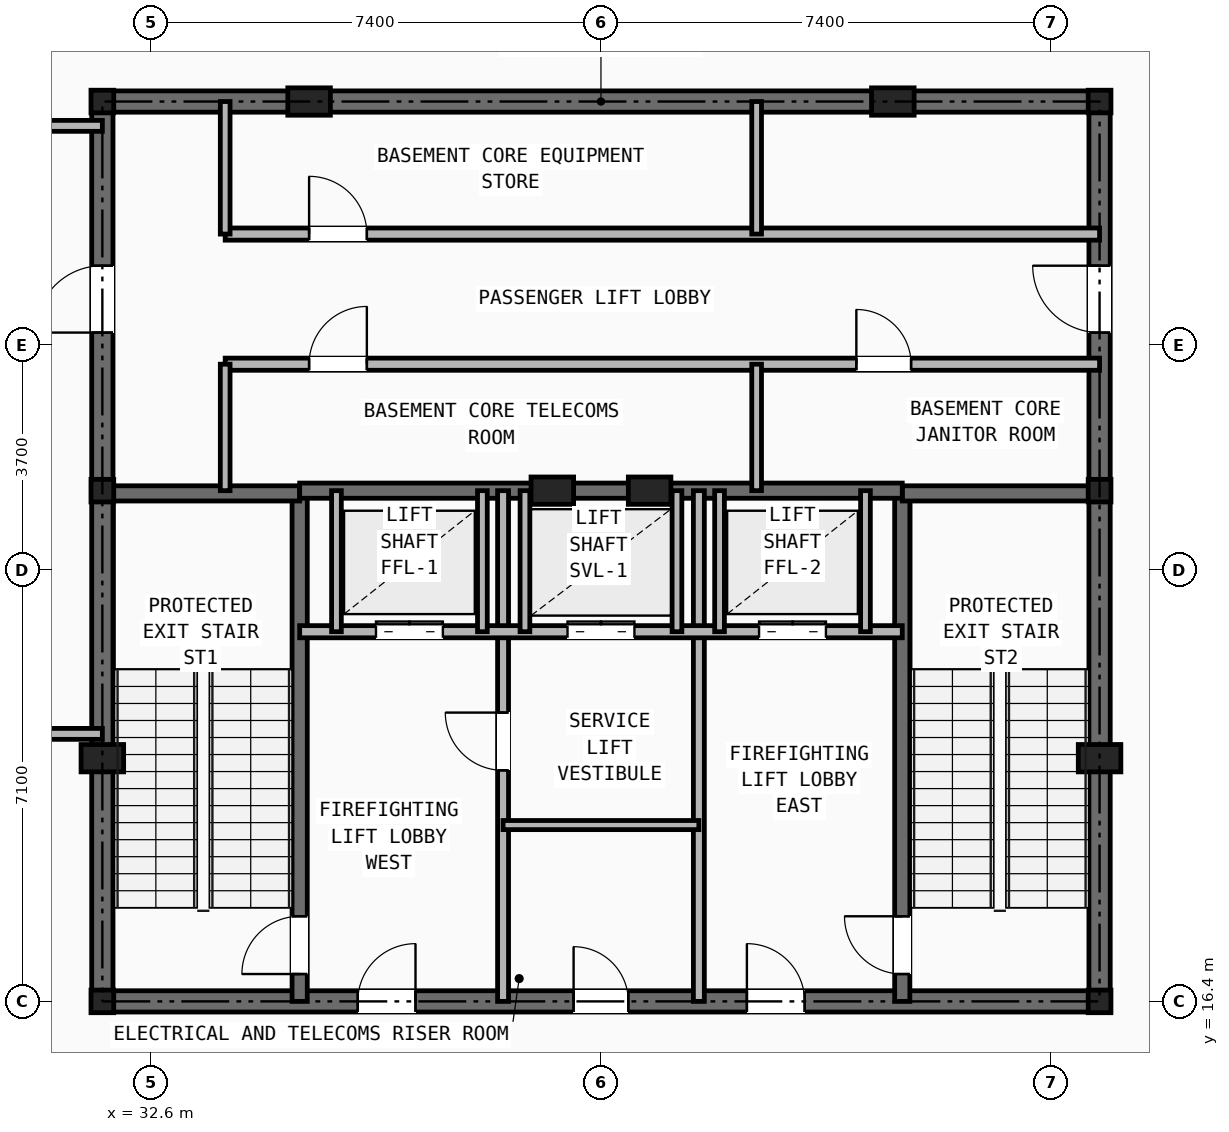
"""IFC4 building model, lengths in metres.
Left out: names, types, materials, properties, quantities, classifications, styles, units other than length and angle.
Written with IfcOpenShell. Run it as: python <this file> out.ifc"""

import sys

from ifc_helpers import new_model, si_unit, direction, frame, frame_2d, origin, origin_2d, place, context, subcontext, project, spatial, rectangle, i_section, extrude, element, fill, save


model = new_model("IFC4")
c1 = context("Model", 3, precision=1e-05, world=origin(), true_north=direction((0.0, 1.0)))
c2 = subcontext(c1, "Body", "Model", "MODEL_VIEW")
j1 = project(units=[si_unit("LENGTHUNIT", "METRE"), si_unit("PLANEANGLEUNIT", "RADIAN")], contexts=[c1])
p1 = place(None, origin())
s1 = spatial("IfcSite", under=j1, at=p1, CompositionType="ELEMENT")
p2 = place(p1, origin())
s2 = spatial("IfcBuilding", under=s1, at=p2, CompositionType="ELEMENT")
p3 = place(p2, frame((0.0, 0.0, -10.0)))
s3 = spatial("IfcBuildingStorey", under=s2, at=p3, CompositionType="ELEMENT", Elevation=-10.0)
for number, where, z_axis, x_axis in (
    (1, (31.8, 16.4, 0.0), (0.0, 0.0, 1.0), (1.0, 0.0, 0.0)),
    (2, (48.2, 16.4, 0.0), (0.0, 0.0, 1.0), (1.0, 0.0, 0.0)),
    (3, (31.8, 24.8, 0.0), (0.0, 0.0, 1.0), (1.0, 0.0, 0.0)),
    (4, (48.2, 24.8, 0.0), (0.0, 0.0, 1.0), (1.0, 0.0, 0.0)),
    (5, (31.8, 31.2, 0.0), (0.0, 0.0, 1.0), (1.0, 0.0, 0.0)),
    (6, (48.2, 31.2, 0.0), (0.0, 0.0, 1.0), (1.0, 0.0, 0.0)),
):
    element("IfcColumn", number, at=place(p3, frame(where, z_axis=z_axis, x_axis=x_axis)), inside=s3, PredefinedType="COLUMN", context=c2, shape_type="SweptSolid", body=[
        extrude(i_section(OverallWidth=0.374, OverallDepth=0.372, WebThickness=0.016, FlangeThickness=0.026, at=origin_2d()), origin(), (0.0, 0.0, 1.0), 5.0),
    ])
for number, where, z_axis, x_axis in (
    (7, (31.8, 20.4, 0.0), (0.0, 0.0, 1.0), (1.0, 0.0, 0.0)),
    (8, (48.2, 20.4, 0.0), (0.0, 0.0, 1.0), (1.0, 0.0, 0.0)),
    (9, (35.2, 31.2, 0.0), (0.0, 0.0, 1.0), (1.0, 0.0, 0.0)),
    (10, (44.8, 31.2, 0.0), (0.0, 0.0, 1.0), (1.0, 0.0, 0.0)),
    (11, (39.2, 24.8, 0.0), (0.0, 0.0, 1.0), (1.0, 0.0, 0.0)),
    (12, (40.8, 24.8, 0.0), (0.0, 0.0, 1.0), (1.0, 0.0, 0.0)),
):
    element("IfcColumn", number, at=place(p3, frame(where, z_axis=z_axis, x_axis=x_axis)), inside=s3, PredefinedType="PILASTER", context=c2, shape_type="SweptSolid", body=[
        extrude(rectangle(XDim=0.7, YDim=0.45, at=origin_2d()), origin(), (0.0, 0.0, 1.0), 5.0),
    ])
p4 = place(p3, frame((31.8, 16.4, 0.0), z_axis=(0.0, 0.0, 1.0), x_axis=(1.0, 0.0, 0.0)))
e13 = element("IfcWall", 13, at=p4, inside=s3, PredefinedType="SHEAR", context=c2, shape_type="SweptSolid", body=[
    extrude(rectangle(XDim=16.4, YDim=0.35, at=frame_2d((8.2, 0.0))), origin(), (0.0, 0.0, 1.0), 4.64),
])
p5 = place(p4, frame((7.75, 0.0, 0.0)))
e14 = element("IfcOpeningElement", 14, at=p5, cuts=e13, PredefinedType="OPENING", context=c2, shape_type="SweptSolid", body=[
    extrude(rectangle(XDim=0.9, YDim=2.1, at=frame_2d((0.45, 1.05))), frame((0.0, 0.185, 0.0), z_axis=(0.0, -1.0, 0.0), x_axis=(1.0, 0.0, 0.0)), (0.0, 0.0, 1.0), 0.37),
])
p6 = place(p4, frame((4.2, 0.0, 0.0)))
e15 = element("IfcOpeningElement", 15, at=p6, cuts=e13, PredefinedType="OPENING", context=c2, shape_type="SweptSolid", body=[
    extrude(rectangle(XDim=0.95, YDim=2.1, at=frame_2d((0.475, 1.05))), frame((0.0, 0.185, 0.0), z_axis=(0.0, -1.0, 0.0), x_axis=(1.0, 0.0, 0.0)), (0.0, 0.0, 1.0), 0.37),
])
p7 = place(p4, frame((10.6, 0.0, 0.0)))
e16 = element("IfcOpeningElement", 16, at=p7, cuts=e13, PredefinedType="OPENING", context=c2, shape_type="SweptSolid", body=[
    extrude(rectangle(XDim=0.95, YDim=2.1, at=frame_2d((0.475, 1.05))), frame((0.0, 0.185, 0.0), z_axis=(0.0, -1.0, 0.0), x_axis=(1.0, 0.0, 0.0)), (0.0, 0.0, 1.0), 0.37),
])
p8 = place(p3, frame((31.8, 31.2, 0.0), z_axis=(0.0, 0.0, 1.0), x_axis=(1.0, 0.0, 0.0)))
e17 = element("IfcWall", 17, at=p8, inside=s3, PredefinedType="SHEAR", context=c2, shape_type="SweptSolid", body=[
    extrude(rectangle(XDim=16.4, YDim=0.35, at=frame_2d((8.2, 0.0))), origin(), (0.0, 0.0, 1.0), 4.64),
])
p9 = place(p3, frame((31.8, 16.4, 0.0), z_axis=(0.0, 0.0, 1.0), x_axis=(0.0, 1.0, 0.0)))
e18 = element("IfcWall", 18, at=p9, inside=s3, PredefinedType="SHEAR", context=c2, shape_type="SweptSolid", body=[
    extrude(rectangle(XDim=14.8, YDim=0.35, at=frame_2d((7.4, 0.0))), origin(), (0.0, 0.0, 1.0), 4.64),
])
p10 = place(p9, frame((11.0, 0.0, 0.0)))
e19 = element("IfcOpeningElement", 19, at=p10, cuts=e18, PredefinedType="OPENING", context=c2, shape_type="SweptSolid", body=[
    extrude(rectangle(XDim=1.1, YDim=2.15, at=frame_2d((0.55, 1.075))), frame((0.0, 0.185, 0.0), z_axis=(0.0, -1.0, 0.0), x_axis=(1.0, 0.0, 0.0)), (0.0, 0.0, 1.0), 0.37),
])
p11 = place(p3, frame((48.2, 16.4, 0.0), z_axis=(0.0, 0.0, 1.0), x_axis=(0.0, 1.0, 0.0)))
e20 = element("IfcWall", 20, at=p11, inside=s3, PredefinedType="SHEAR", context=c2, shape_type="SweptSolid", body=[
    extrude(rectangle(XDim=14.8, YDim=0.35, at=frame_2d((7.4, 0.0))), origin(), (0.0, 0.0, 1.0), 4.64),
])
p12 = place(p11, frame((11.0, 0.0, 0.0)))
e21 = element("IfcOpeningElement", 21, at=p12, cuts=e20, PredefinedType="OPENING", context=c2, shape_type="SweptSolid", body=[
    extrude(rectangle(XDim=1.1, YDim=2.15, at=frame_2d((0.55, 1.075))), frame((0.0, 0.185, 0.0), z_axis=(0.0, -1.0, 0.0), x_axis=(1.0, 0.0, 0.0)), (0.0, 0.0, 1.0), 0.37),
])
p13 = place(p3, frame((35.045, 16.4, 0.0), z_axis=(0.0, 0.0, 1.0), x_axis=(0.0, 1.0, 0.0)))
e22 = element("IfcWall", 22, at=p13, inside=s3, PredefinedType="SHEAR", context=c2, shape_type="SweptSolid", body=[
    extrude(rectangle(XDim=8.4, YDim=0.25, at=frame_2d((4.2, 0.0))), origin(), (0.0, 0.0, 1.0), 4.64),
])
p14 = place(p13, frame((0.45, 0.0, 0.0)))
e23 = element("IfcOpeningElement", 23, at=p14, cuts=e22, PredefinedType="OPENING", context=c2, shape_type="SweptSolid", body=[
    extrude(rectangle(XDim=0.95, YDim=2.1, at=frame_2d((0.475, 1.05))), frame((0.0, 0.135, 0.0), z_axis=(0.0, -1.0, 0.0), x_axis=(1.0, 0.0, 0.0)), (0.0, 0.0, 1.0), 0.27),
])
p15 = place(p3, frame((31.8, 24.755, 0.0), z_axis=(0.0, 0.0, 1.0), x_axis=(1.0, 0.0, 0.0)))
e24 = element("IfcWall", 24, at=p15, inside=s3, PredefinedType="SHEAR", context=c2, shape_type="SweptSolid", body=[
    extrude(rectangle(XDim=3.245, YDim=0.25, at=frame_2d((1.623, 0.0))), origin(), (0.0, 0.0, 1.0), 4.64),
])
p16 = place(p3, frame((44.955, 16.4, 0.0), z_axis=(0.0, 0.0, 1.0), x_axis=(0.0, 1.0, 0.0)))
e25 = element("IfcWall", 25, at=p16, inside=s3, PredefinedType="SHEAR", context=c2, shape_type="SweptSolid", body=[
    extrude(rectangle(XDim=8.4, YDim=0.25, at=frame_2d((4.2, 0.0))), origin(), (0.0, 0.0, 1.0), 4.64),
])
p17 = place(p16, frame((0.45, 0.0, 0.0)))
e26 = element("IfcOpeningElement", 26, at=p17, cuts=e25, PredefinedType="OPENING", context=c2, shape_type="SweptSolid", body=[
    extrude(rectangle(XDim=0.95, YDim=2.1, at=frame_2d((0.475, 1.05))), frame((0.0, 0.135, 0.0), z_axis=(0.0, -1.0, 0.0), x_axis=(1.0, 0.0, 0.0)), (0.0, 0.0, 1.0), 0.27),
])
p18 = place(p3, frame((44.955, 24.755, 0.0), z_axis=(0.0, 0.0, 1.0), x_axis=(1.0, 0.0, 0.0)))
e27 = element("IfcWall", 27, at=p18, inside=s3, PredefinedType="SHEAR", context=c2, shape_type="SweptSolid", body=[
    extrude(rectangle(XDim=3.245, YDim=0.25, at=frame_2d((1.623, 0.0))), origin(), (0.0, 0.0, 1.0), 4.64),
])
p19 = place(p3, frame((35.045, 24.8, 0.0), z_axis=(0.0, 0.0, 1.0), x_axis=(1.0, 0.0, 0.0)))
e28 = element("IfcWall", 28, at=p19, inside=s3, PredefinedType="SHEAR", context=c2, shape_type="SweptSolid", body=[
    extrude(rectangle(XDim=9.91, YDim=0.25, at=frame_2d((4.955, 0.0))), origin(), (0.0, 0.0, 1.0), 4.64),
])
p20 = place(p3, frame((38.39, 16.4, 0.0), z_axis=(0.0, 0.0, 1.0), x_axis=(0.0, 1.0, 0.0)))
e29 = element("IfcWall", 29, at=p20, inside=s3, PredefinedType="PARTITIONING", context=c2, shape_type="SweptSolid", body=[
    extrude(rectangle(XDim=8.4, YDim=0.18, at=frame_2d((4.2, 0.0))), origin(), (0.0, 0.0, 1.0), 3.78),
])
p21 = place(p20, frame((3.8, 0.0, 0.0)))
e30 = element("IfcOpeningElement", 30, at=p21, cuts=e29, PredefinedType="OPENING", context=c2, shape_type="SweptSolid", body=[
    extrude(rectangle(XDim=0.95, YDim=2.1, at=frame_2d((0.475, 1.05))), frame((0.0, 0.1, 0.0), z_axis=(0.0, -1.0, 0.0), x_axis=(1.0, 0.0, 0.0)), (0.0, 0.0, 1.0), 0.2),
])
p22 = place(p3, frame((41.61, 16.4, 0.0), z_axis=(0.0, 0.0, 1.0), x_axis=(0.0, 1.0, 0.0)))
e31 = element("IfcWall", 31, at=p22, inside=s3, PredefinedType="PARTITIONING", context=c2, shape_type="SweptSolid", body=[
    extrude(rectangle(XDim=8.4, YDim=0.18, at=frame_2d((4.2, 0.0))), origin(), (0.0, 0.0, 1.0), 3.78),
])
p23 = place(p3, frame((35.045, 22.48, 0.0), z_axis=(0.0, 0.0, 1.0), x_axis=(1.0, 0.0, 0.0)))
e32 = element("IfcWall", 32, at=p23, inside=s3, PredefinedType="SOLIDWALL", context=c2, shape_type="SweptSolid", body=[
    extrude(rectangle(XDim=9.91, YDim=0.2, at=frame_2d((4.955, 0.0))), origin(), (0.0, 0.0, 1.0), 4.64),
])
p24 = place(p23, frame((1.255, 0.0, 0.0)))
e33 = element("IfcOpeningElement", 33, at=p24, cuts=e32, PredefinedType="OPENING", context=c2, shape_type="SweptSolid", body=[
    extrude(rectangle(XDim=1.1, YDim=2.15, at=frame_2d((0.55, 1.075))), frame((0.0, 0.11, 0.0), z_axis=(0.0, -1.0, 0.0), x_axis=(1.0, 0.0, 0.0)), (0.0, 0.0, 1.0), 0.22),
])
p25 = place(p23, frame((7.555, 0.0, 0.0)))
e34 = element("IfcOpeningElement", 34, at=p25, cuts=e32, PredefinedType="OPENING", context=c2, shape_type="SweptSolid", body=[
    extrude(rectangle(XDim=1.1, YDim=2.15, at=frame_2d((0.55, 1.075))), frame((0.0, 0.11, 0.0), z_axis=(0.0, -1.0, 0.0), x_axis=(1.0, 0.0, 0.0)), (0.0, 0.0, 1.0), 0.22),
])
p26 = place(p23, frame((4.405, 0.0, 0.0)))
e35 = element("IfcOpeningElement", 35, at=p26, cuts=e32, PredefinedType="OPENING", context=c2, shape_type="SweptSolid", body=[
    extrude(rectangle(XDim=1.1, YDim=2.15, at=frame_2d((0.55, 1.075))), frame((0.0, 0.11, 0.0), z_axis=(0.0, -1.0, 0.0), x_axis=(1.0, 0.0, 0.0)), (0.0, 0.0, 1.0), 0.22),
])
p27 = place(p3, frame((38.39, 19.3, 0.0), z_axis=(0.0, 0.0, 1.0), x_axis=(1.0, 0.0, 0.0)))
e36 = element("IfcWall", 36, at=p27, inside=s3, PredefinedType="PARTITIONING", context=c2, shape_type="SweptSolid", body=[
    extrude(rectangle(XDim=3.22, YDim=0.15, at=frame_2d((1.61, 0.0))), origin(), (0.0, 0.0, 1.0), 4.64),
])
for number, where, z_axis, x_axis in (
    (37, (35.65, 22.48, 0.0), (0.0, 0.0, 1.0), (0.0, 1.0, 0.0)),
    (38, (38.05, 22.48, 0.0), (0.0, 0.0, 1.0), (0.0, 1.0, 0.0)),
    (39, (41.95, 22.48, 0.0), (0.0, 0.0, 1.0), (0.0, 1.0, 0.0)),
    (40, (44.35, 22.48, 0.0), (0.0, 0.0, 1.0), (0.0, 1.0, 0.0)),
    (41, (38.75, 22.48, 0.0), (0.0, 0.0, 1.0), (0.0, 1.0, 0.0)),
    (42, (41.25, 22.48, 0.0), (0.0, 0.0, 1.0), (0.0, 1.0, 0.0)),
):
    element("IfcWall", number, at=place(p3, frame(where, z_axis=z_axis, x_axis=x_axis)), inside=s3, PredefinedType="SOLIDWALL", context=c2, shape_type="SweptSolid", body=[
        extrude(rectangle(XDim=2.32, YDim=0.16, at=frame_2d((1.16, 0.0))), origin(), (0.0, 0.0, 1.0), 4.64),
    ])
p28 = place(p3, frame((33.82, 29.02, 0.0), z_axis=(0.0, 0.0, 1.0), x_axis=(1.0, 0.0, 0.0)))
e43 = element("IfcWall", 43, at=p28, inside=s3, PredefinedType="SOLIDWALL", context=c2, shape_type="SweptSolid", body=[
    extrude(rectangle(XDim=14.38, YDim=0.2, at=frame_2d((7.19, 0.0))), origin(), (0.0, 0.0, 1.0), 4.64),
])
p29 = place(p28, frame((1.38, 0.0, 0.0)))
e44 = element("IfcOpeningElement", 44, at=p29, cuts=e43, PredefinedType="OPENING", context=c2, shape_type="SweptSolid", body=[
    extrude(rectangle(XDim=0.95, YDim=2.1, at=frame_2d((0.475, 1.05))), frame((0.0, 0.11, 0.0), z_axis=(0.0, -1.0, 0.0), x_axis=(1.0, 0.0, 0.0)), (0.0, 0.0, 1.0), 0.22),
])
p30 = place(p3, frame((33.82, 26.88, 0.0), z_axis=(0.0, 0.0, 1.0), x_axis=(1.0, 0.0, 0.0)))
e45 = element("IfcWall", 45, at=p30, inside=s3, PredefinedType="SOLIDWALL", context=c2, shape_type="SweptSolid", body=[
    extrude(rectangle(XDim=14.38, YDim=0.2, at=frame_2d((7.19, 0.0))), origin(), (0.0, 0.0, 1.0), 4.64),
])
p31 = place(p30, frame((1.38, 0.0, 0.0)))
e46 = element("IfcOpeningElement", 46, at=p31, cuts=e45, PredefinedType="OPENING", context=c2, shape_type="SweptSolid", body=[
    extrude(rectangle(XDim=0.95, YDim=2.1, at=frame_2d((0.475, 1.05))), frame((0.0, 0.11, 0.0), z_axis=(0.0, -1.0, 0.0), x_axis=(1.0, 0.0, 0.0)), (0.0, 0.0, 1.0), 0.22),
])
p32 = place(p30, frame((10.38, 0.0, 0.0)))
e47 = element("IfcOpeningElement", 47, at=p32, cuts=e45, PredefinedType="OPENING", context=c2, shape_type="SweptSolid", body=[
    extrude(rectangle(XDim=0.9, YDim=2.1, at=frame_2d((0.45, 1.05))), frame((0.0, 0.11, 0.0), z_axis=(0.0, -1.0, 0.0), x_axis=(1.0, 0.0, 0.0)), (0.0, 0.0, 1.0), 0.22),
])
p33 = place(p3, frame((33.82, 29.02, 0.0), z_axis=(0.0, 0.0, 1.0), x_axis=(0.0, 1.0, 0.0)))
e48 = element("IfcWall", 48, at=p33, inside=s3, PredefinedType="SOLIDWALL", context=c2, shape_type="SweptSolid", body=[
    extrude(rectangle(XDim=2.18, YDim=0.16, at=frame_2d((1.09, 0.0))), origin(), (0.0, 0.0, 1.0), 3.78),
])
p34 = place(p3, frame((33.82, 24.8, 0.0), z_axis=(0.0, 0.0, 1.0), x_axis=(0.0, 1.0, 0.0)))
e49 = element("IfcWall", 49, at=p34, inside=s3, PredefinedType="SOLIDWALL", context=c2, shape_type="SweptSolid", body=[
    extrude(rectangle(XDim=2.08, YDim=0.16, at=frame_2d((1.04, 0.0))), origin(), (0.0, 0.0, 1.0), 4.64),
])
p35 = place(p3, frame((42.56, 29.02, 0.0), z_axis=(0.0, 0.0, 1.0), x_axis=(0.0, 1.0, 0.0)))
e50 = element("IfcWall", 50, at=p35, inside=s3, PredefinedType="SOLIDWALL", context=c2, shape_type="SweptSolid", body=[
    extrude(rectangle(XDim=2.18, YDim=0.16, at=frame_2d((1.09, 0.0))), origin(), (0.0, 0.0, 1.0), 3.78),
])
p36 = place(p3, frame((42.56, 24.8, 0.0), z_axis=(0.0, 0.0, 1.0), x_axis=(0.0, 1.0, 0.0)))
e51 = element("IfcWall", 51, at=p36, inside=s3, PredefinedType="SOLIDWALL", context=c2, shape_type="SweptSolid", body=[
    extrude(rectangle(XDim=2.08, YDim=0.16, at=frame_2d((1.04, 0.0))), origin(), (0.0, 0.0, 1.0), 4.64),
])
p37 = place(p3, frame((25.2, 20.8, 0.0), z_axis=(0.0, 0.0, 1.0), x_axis=(1.0, 0.0, 0.0)))
e52 = element("IfcWall", 52, at=p37, inside=s3, PredefinedType="PARTITIONING", context=c2, shape_type="SweptSolid", body=[
    extrude(rectangle(XDim=6.6, YDim=0.18, at=frame_2d((3.3, 0.0))), origin(), (0.0, 0.0, 1.0), 4.64),
])
p38 = place(p3, frame((25.2, 30.8, 0.0), z_axis=(0.0, 0.0, 1.0), x_axis=(1.0, 0.0, 0.0)))
e53 = element("IfcWall", 53, at=p38, inside=s3, PredefinedType="PARTITIONING", context=c2, shape_type="SweptSolid", body=[
    extrude(rectangle(XDim=6.6, YDim=0.18, at=frame_2d((3.3, 0.0))), origin(), (0.0, 0.0, 1.0), 3.78),
])
p39 = place(p5, origin())
e54 = element("IfcDoor", 54, at=p39, inside=s3, OperationType="SINGLE_SWING_LEFT", PredefinedType="DOOR", context=c2, shape_type="SweptSolid", body=[
    extrude(rectangle(XDim=0.9, YDim=2.1, at=frame_2d((0.45, 1.05))), frame((0.0, 0.025, 0.0), z_axis=(0.0, -1.0, 0.0), x_axis=(1.0, 0.0, 0.0)), (0.0, 0.0, 1.0), 0.05),
])
fill(e14, e54)
p40 = place(p21, origin())
e55 = element("IfcDoor", 55, at=p40, inside=s3, OperationType="SINGLE_SWING_RIGHT", PredefinedType="DOOR", context=c2, shape_type="SweptSolid", body=[
    extrude(rectangle(XDim=0.95, YDim=2.1, at=frame_2d((0.475, 1.05))), frame((0.0, 0.025, 0.0), z_axis=(0.0, -1.0, 0.0), x_axis=(1.0, 0.0, 0.0)), (0.0, 0.0, 1.0), 0.05),
])
fill(e30, e55)
p41 = place(p14, origin())
e56 = element("IfcDoor", 56, at=p41, inside=s3, OperationType="SINGLE_SWING_LEFT", PredefinedType="DOOR", context=c2, shape_type="SweptSolid", body=[
    extrude(rectangle(XDim=0.95, YDim=2.1, at=frame_2d((0.475, 1.05))), frame((0.0, 0.025, 0.0), z_axis=(0.0, -1.0, 0.0), x_axis=(1.0, 0.0, 0.0)), (0.0, 0.0, 1.0), 0.05),
])
fill(e23, e56)
p42 = place(p17, origin())
e57 = element("IfcDoor", 57, at=p42, inside=s3, OperationType="SINGLE_SWING_RIGHT", PredefinedType="DOOR", context=c2, shape_type="SweptSolid", body=[
    extrude(rectangle(XDim=0.95, YDim=2.1, at=frame_2d((0.475, 1.05))), frame((0.0, 0.025, 0.0), z_axis=(0.0, -1.0, 0.0), x_axis=(1.0, 0.0, 0.0)), (0.0, 0.0, 1.0), 0.05),
])
fill(e26, e57)
p43 = place(p6, origin())
e58 = element("IfcDoor", 58, at=p43, inside=s3, OperationType="SINGLE_SWING_RIGHT", PredefinedType="DOOR", context=c2, shape_type="SweptSolid", body=[
    extrude(rectangle(XDim=0.95, YDim=2.1, at=frame_2d((0.475, 1.05))), frame((0.0, 0.025, 0.0), z_axis=(0.0, -1.0, 0.0), x_axis=(1.0, 0.0, 0.0)), (0.0, 0.0, 1.0), 0.05),
])
fill(e15, e58)
p44 = place(p7, origin())
e59 = element("IfcDoor", 59, at=p44, inside=s3, OperationType="SINGLE_SWING_LEFT", PredefinedType="DOOR", context=c2, shape_type="SweptSolid", body=[
    extrude(rectangle(XDim=0.95, YDim=2.1, at=frame_2d((0.475, 1.05))), frame((0.0, 0.025, 0.0), z_axis=(0.0, -1.0, 0.0), x_axis=(1.0, 0.0, 0.0)), (0.0, 0.0, 1.0), 0.05),
])
fill(e16, e59)
p45 = place(p24, origin())
e60 = element("IfcDoor", 60, at=p45, inside=s3, OperationType="DOUBLE_DOOR_SLIDING", PredefinedType="DOOR", context=c2, shape_type="SweptSolid", body=[
    extrude(rectangle(XDim=1.1, YDim=2.15, at=frame_2d((0.55, 1.075))), frame((0.0, 0.025, 0.0), z_axis=(0.0, -1.0, 0.0), x_axis=(1.0, 0.0, 0.0)), (0.0, 0.0, 1.0), 0.05),
])
fill(e33, e60)
p46 = place(p25, origin())
e61 = element("IfcDoor", 61, at=p46, inside=s3, OperationType="DOUBLE_DOOR_SLIDING", PredefinedType="DOOR", context=c2, shape_type="SweptSolid", body=[
    extrude(rectangle(XDim=1.1, YDim=2.15, at=frame_2d((0.55, 1.075))), frame((0.0, 0.025, 0.0), z_axis=(0.0, -1.0, 0.0), x_axis=(1.0, 0.0, 0.0)), (0.0, 0.0, 1.0), 0.05),
])
fill(e34, e61)
p47 = place(p26, origin())
e62 = element("IfcDoor", 62, at=p47, inside=s3, OperationType="DOUBLE_DOOR_SLIDING", PredefinedType="DOOR", context=c2, shape_type="SweptSolid", body=[
    extrude(rectangle(XDim=1.1, YDim=2.15, at=frame_2d((0.55, 1.075))), frame((0.0, 0.025, 0.0), z_axis=(0.0, -1.0, 0.0), x_axis=(1.0, 0.0, 0.0)), (0.0, 0.0, 1.0), 0.05),
])
fill(e35, e62)
p48 = place(p10, origin())
e63 = element("IfcDoor", 63, at=p48, inside=s3, OperationType="SINGLE_SWING_LEFT", PredefinedType="DOOR", context=c2, shape_type="SweptSolid", body=[
    extrude(rectangle(XDim=1.1, YDim=2.15, at=frame_2d((0.55, 1.075))), frame((0.0, 0.025, 0.0), z_axis=(0.0, -1.0, 0.0), x_axis=(1.0, 0.0, 0.0)), (0.0, 0.0, 1.0), 0.05),
])
fill(e19, e63)
p49 = place(p12, origin())
e64 = element("IfcDoor", 64, at=p49, inside=s3, OperationType="SINGLE_SWING_RIGHT", PredefinedType="DOOR", context=c2, shape_type="SweptSolid", body=[
    extrude(rectangle(XDim=1.1, YDim=2.15, at=frame_2d((0.55, 1.075))), frame((0.0, 0.025, 0.0), z_axis=(0.0, -1.0, 0.0), x_axis=(1.0, 0.0, 0.0)), (0.0, 0.0, 1.0), 0.05),
])
fill(e21, e64)
p50 = place(p29, origin())
e65 = element("IfcDoor", 65, at=p50, inside=s3, OperationType="SINGLE_SWING_LEFT", PredefinedType="DOOR", context=c2, shape_type="SweptSolid", body=[
    extrude(rectangle(XDim=0.95, YDim=2.1, at=frame_2d((0.475, 1.05))), frame((0.0, 0.025, 0.0), z_axis=(0.0, -1.0, 0.0), x_axis=(1.0, 0.0, 0.0)), (0.0, 0.0, 1.0), 0.05),
])
fill(e44, e65)
p51 = place(p31, origin())
e66 = element("IfcDoor", 66, at=p51, inside=s3, OperationType="SINGLE_SWING_RIGHT", PredefinedType="DOOR", context=c2, shape_type="SweptSolid", body=[
    extrude(rectangle(XDim=0.95, YDim=2.1, at=frame_2d((0.475, 1.05))), frame((0.0, 0.025, 0.0), z_axis=(0.0, -1.0, 0.0), x_axis=(1.0, 0.0, 0.0)), (0.0, 0.0, 1.0), 0.05),
])
fill(e46, e66)
p52 = place(p32, origin())
e67 = element("IfcDoor", 67, at=p52, inside=s3, OperationType="SINGLE_SWING_LEFT", PredefinedType="DOOR", context=c2, shape_type="SweptSolid", body=[
    extrude(rectangle(XDim=0.9, YDim=2.1, at=frame_2d((0.45, 1.05))), frame((0.0, 0.025, 0.0), z_axis=(0.0, -1.0, 0.0), x_axis=(1.0, 0.0, 0.0)), (0.0, 0.0, 1.0), 0.05),
])
fill(e47, e67)
save(model, sys.argv[1])
